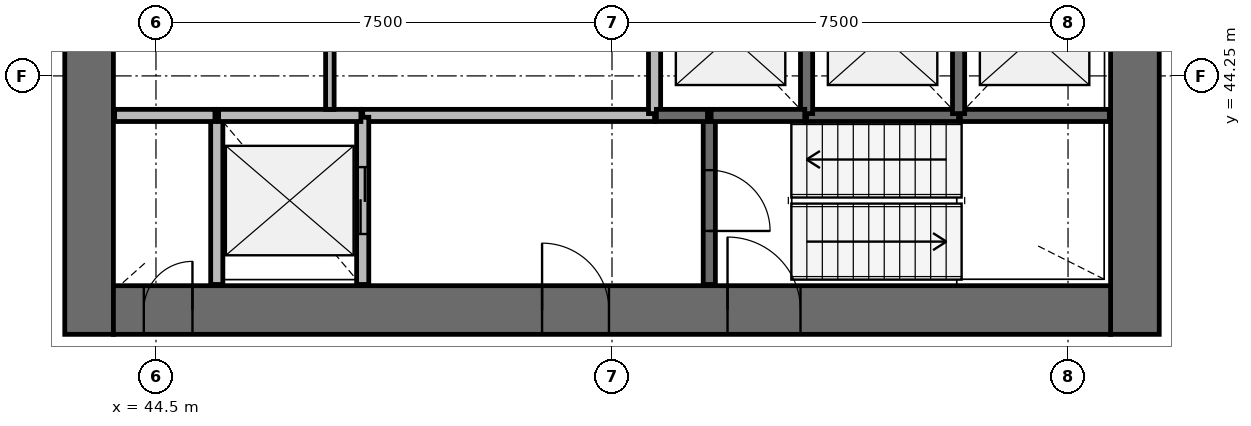
"""IFC4 building model, lengths in metres.
Left out: names, types, materials, properties, quantities, classifications, styles, units other than length and angle.
Written with IfcOpenShell. Run it as: python <this file> out.ifc"""

import sys

from ifc_helpers import new_model, si_unit, direction, frame, frame_2d, origin, place, context, subcontext, project, spatial, rectangle, extrude, source, transform, mapped, element, fill, save


model = new_model("IFC4")
c1 = context("Model", 3, precision=1e-05, world=origin(), true_north=direction((0.0, 1.0)))
c2 = subcontext(c1, "Body", "Model", "MODEL_VIEW")
j1 = project(units=[si_unit("LENGTHUNIT", "METRE"), si_unit("PLANEANGLEUNIT", "RADIAN")], contexts=[c1])
p1 = place(None, origin())
s1 = spatial("IfcSite", under=j1, at=p1, CompositionType="ELEMENT")
p2 = place(p1, origin())
s2 = spatial("IfcBuilding", under=s1, at=p2, CompositionType="ELEMENT")
p3 = place(p2, frame((0.0, 0.0, 152.6)))
s3 = spatial("IfcBuildingStorey", under=s2, at=p3, CompositionType="ELEMENT", Elevation=152.6)
p4 = place(p3, frame((60.6, 40.0, 0.0), z_axis=(0.0, 0.0, 1.0), x_axis=(0.0, 1.0, 0.0)))
e1 = element("IfcWall", 1, at=p4, inside=s3, PredefinedType="SHEAR", context=c2, shape_type="SweptSolid", body=[
    extrude(rectangle(XDim=16.0, YDim=0.8, at=frame_2d((8.0, 0.0))), origin(), (0.0, 0.0, 1.0), 3.9),
])
p5 = place(p4, frame((7.1, 0.0, 0.0)))
e2 = element("IfcOpeningElement", 2, at=p5, cuts=e1, PredefinedType="OPENING", context=c2, shape_type="SweptSolid", body=[
    extrude(rectangle(XDim=1.8, YDim=2.1, at=frame_2d((0.9, 1.05))), frame((0.0, 0.41, 0.0), z_axis=(0.0, -1.0, 0.0), x_axis=(1.0, 0.0, 0.0)), (0.0, 0.0, 1.0), 0.82),
])
p6 = place(p3, frame((43.4, 56.0, 0.0), z_axis=(0.0, 0.0, 1.0), x_axis=(0.0, -1.0, 0.0)))
e3 = element("IfcWall", 3, at=p6, inside=s3, PredefinedType="SHEAR", context=c2, shape_type="SweptSolid", body=[
    extrude(rectangle(XDim=16.0, YDim=0.8, at=frame_2d((8.0, 0.0))), origin(), (0.0, 0.0, 1.0), 3.9),
])
p7 = place(p6, frame((7.1, 0.0, 0.0)))
e4 = element("IfcOpeningElement", 4, at=p7, cuts=e3, PredefinedType="OPENING", context=c2, shape_type="SweptSolid", body=[
    extrude(rectangle(XDim=1.8, YDim=2.1, at=frame_2d((0.9, 1.05))), frame((0.0, 0.41, 0.0), z_axis=(0.0, -1.0, 0.0), x_axis=(1.0, 0.0, 0.0)), (0.0, 0.0, 1.0), 0.82),
])
p8 = place(p3, frame((43.8, 40.4, 0.0), z_axis=(0.0, 0.0, 1.0), x_axis=(1.0, 0.0, 0.0)))
e5 = element("IfcWall", 5, at=p8, inside=s3, PredefinedType="SHEAR", context=c2, shape_type="SweptSolid", body=[
    extrude(rectangle(XDim=16.4, YDim=0.8, at=frame_2d((8.2, 0.0))), origin(), (0.0, 0.0, 1.0), 3.9),
])
p9 = place(p8, frame((10.1, 0.0, 0.0)))
e6 = element("IfcOpeningElement", 6, at=p9, cuts=e5, PredefinedType="OPENING", context=c2, shape_type="SweptSolid", body=[
    extrude(rectangle(XDim=1.2, YDim=2.1, at=frame_2d((0.6, 1.05))), frame((0.0, 0.41, 0.0), z_axis=(0.0, -1.0, 0.0), x_axis=(1.0, 0.0, 0.0)), (0.0, 0.0, 1.0), 0.82),
])
p10 = place(p8, frame((7.05, 0.0, 0.0)))
e7 = element("IfcOpeningElement", 7, at=p10, cuts=e5, PredefinedType="OPENING", context=c2, shape_type="SweptSolid", body=[
    extrude(rectangle(XDim=1.1, YDim=2.1, at=frame_2d((0.55, 1.05))), frame((0.0, 0.41, 0.0), z_axis=(0.0, -1.0, 0.0), x_axis=(1.0, 0.0, 0.0)), (0.0, 0.0, 1.0), 0.82),
])
p11 = place(p8, frame((0.5, 0.0, 0.0)))
e8 = element("IfcOpeningElement", 8, at=p11, cuts=e5, PredefinedType="OPENING", context=c2, shape_type="SweptSolid", body=[
    extrude(rectangle(XDim=0.8, YDim=2.1, at=frame_2d((0.4, 1.05))), frame((0.0, 0.41, 0.0), z_axis=(0.0, -1.0, 0.0), x_axis=(1.0, 0.0, 0.0)), (0.0, 0.0, 1.0), 0.82),
])
p12 = place(p3, frame((52.7, 43.6, 0.0), z_axis=(0.0, 0.0, 1.0), x_axis=(-1.0, 0.0, 0.0)))
e9 = element("IfcWall", 9, at=p12, inside=s3, PredefinedType="SOLIDWALL", context=c2, shape_type="SweptSolid", body=[
    extrude(rectangle(XDim=4.8, YDim=0.2, at=frame_2d((2.4, 0.0))), origin(), (0.0, 0.0, 1.0), 3.58),
])
p13 = place(p3, frame((45.5, 43.6, 0.0), z_axis=(0.0, 0.0, 1.0), x_axis=(0.0, -1.0, 0.0)))
e10 = element("IfcWall", 10, at=p13, inside=s3, PredefinedType="SOLIDWALL", context=c2, shape_type="SweptSolid", body=[
    extrude(rectangle(XDim=2.78, YDim=0.2, at=frame_2d((1.39, 0.0))), origin(), (0.0, 0.0, 1.0), 3.58),
])
p14 = place(p3, frame((47.9, 40.82, 0.0), z_axis=(0.0, 0.0, 1.0), x_axis=(0.0, 1.0, 0.0)))
e11 = element("IfcWall", 11, at=p14, inside=s3, PredefinedType="SOLIDWALL", context=c2, shape_type="SweptSolid", body=[
    extrude(rectangle(XDim=2.75, YDim=0.2, at=frame_2d((1.375, 0.0))), origin(), (0.0, 0.0, 1.0), 3.58),
])
p15 = place(p14, frame((0.83, 0.0, 0.0)))
e12 = element("IfcOpeningElement", 12, at=p15, cuts=e11, PredefinedType="OPENING", context=c2, shape_type="SweptSolid", body=[
    extrude(rectangle(XDim=1.1, YDim=2.1, at=frame_2d((0.55, 1.05))), frame((0.0, 0.11, 0.0), z_axis=(0.0, -1.0, 0.0), x_axis=(1.0, 0.0, 0.0)), (0.0, 0.0, 1.0), 0.22),
])
p16 = place(p3, frame((53.6, 43.6, 0.0), z_axis=(0.0, 0.0, 1.0), x_axis=(0.0, -1.0, 0.0)))
e13 = element("IfcWall", 13, at=p16, inside=s3, PredefinedType="SOLIDWALL", context=c2, shape_type="SweptSolid", body=[
    extrude(rectangle(XDim=2.78, YDim=0.2, at=frame_2d((1.39, 0.0))), origin(), (0.0, 0.0, 1.0), 3.58),
])
p17 = place(p16, frame((0.9, 0.0, 0.0)))
e14 = element("IfcOpeningElement", 14, at=p17, cuts=e13, PredefinedType="OPENING", context=c2, shape_type="SweptSolid", body=[
    extrude(rectangle(XDim=1.0, YDim=2.1, at=frame_2d((0.5, 1.05))), frame((0.0, 0.11, 0.0), z_axis=(0.0, -1.0, 0.0), x_axis=(1.0, 0.0, 0.0)), (0.0, 0.0, 1.0), 0.22),
])
p18 = place(p3, frame((55.2, 43.6, 0.0), z_axis=(0.0, 0.0, 1.0), x_axis=(1.0, 0.0, 0.0)))
e15 = element("IfcWall", 15, at=p18, inside=s3, PredefinedType="SOLIDWALL", context=c2, shape_type="SweptSolid", body=[
    extrude(rectangle(XDim=2.5, YDim=0.2, at=frame_2d((1.25, 0.0))), origin(), (0.0, 0.0, 1.0), 3.58),
])
p19 = place(p3, frame((57.73, 43.6, 0.0), z_axis=(0.0, 0.0, 1.0), x_axis=(1.0, 0.0, 0.0)))
e16 = element("IfcWall", 16, at=p19, inside=s3, PredefinedType="SOLIDWALL", context=c2, shape_type="SweptSolid", body=[
    extrude(rectangle(XDim=2.45, YDim=0.2, at=frame_2d((1.225, 0.0))), origin(), (0.0, 0.0, 1.0), 3.58),
])
p20 = place(p3, frame((47.87, 43.6, 0.0), z_axis=(0.0, 0.0, 1.0), x_axis=(-1.0, 0.0, 0.0)))
e17 = element("IfcWall", 17, at=p20, inside=s3, PredefinedType="SOLIDWALL", context=c2, shape_type="SweptSolid", body=[
    extrude(rectangle(XDim=2.34, YDim=0.2, at=frame_2d((1.17, 0.0))), origin(), (0.0, 0.0, 1.0), 3.58),
])
for number, where, z_axis, x_axis in (
    (18, (52.7, 45.99, 0.0), (0.0, 0.0, 1.0), (0.0, -1.0, 0.0)),
    (19, (55.2, 43.63, 0.0), (0.0, 0.0, 1.0), (0.0, 1.0, 0.0)),
    (20, (57.7, 43.63, 0.0), (0.0, 0.0, 1.0), (0.0, 1.0, 0.0)),
):
    element("IfcWall", number, at=place(p3, frame(where, z_axis=z_axis, x_axis=x_axis)), inside=s3, PredefinedType="SOLIDWALL", context=c2, shape_type="SweptSolid", body=[
        extrude(rectangle(XDim=2.36, YDim=0.2, at=frame_2d((1.18, 0.0))), origin(), (0.0, 0.0, 1.0), 3.58),
    ])
p21 = place(p3, frame((45.47, 43.6, 0.0), z_axis=(0.0, 0.0, 1.0), x_axis=(-1.0, 0.0, 0.0)))
e21 = element("IfcWall", 21, at=p21, inside=s3, PredefinedType="SOLIDWALL", context=c2, shape_type="SweptSolid", body=[
    extrude(rectangle(XDim=1.65, YDim=0.2, at=frame_2d((0.825, 0.0))), origin(), (0.0, 0.0, 1.0), 3.58),
])
p22 = place(p3, frame((53.63, 43.6, 0.0), z_axis=(0.0, 0.0, 1.0), x_axis=(1.0, 0.0, 0.0)))
e22 = element("IfcWall", 22, at=p22, inside=s3, PredefinedType="SOLIDWALL", context=c2, shape_type="SweptSolid", body=[
    extrude(rectangle(XDim=1.54, YDim=0.2, at=frame_2d((0.77, 0.0))), origin(), (0.0, 0.0, 1.0), 3.58),
])
p23 = place(p3, frame((52.73, 43.6, 0.0), z_axis=(0.0, 0.0, 1.0), x_axis=(1.0, 0.0, 0.0)))
e23 = element("IfcWall", 23, at=p23, inside=s3, PredefinedType="SOLIDWALL", context=c2, shape_type="SweptSolid", body=[
    extrude(rectangle(XDim=0.84, YDim=0.2, at=frame_2d((0.42, 0.0))), origin(), (0.0, 0.0, 1.0), 3.58),
])
p24 = place(p3, frame((47.36, 43.7, 0.0), z_axis=(0.0, 0.0, 1.0), x_axis=(0.0, 1.0, 0.0)))
e24 = element("IfcWall", 24, at=p24, inside=s3, PredefinedType="PARTITIONING", context=c2, shape_type="SweptSolid", body=[
    extrude(rectangle(XDim=2.29, YDim=0.14, at=frame_2d((1.145, 0.0))), origin(), (0.0, 0.0, 1.0), 2.88),
])
m1 = source(origin(), c2, "Body", "SweptSolid", [
    extrude(rectangle(XDim=1.1, YDim=2.1, at=frame_2d((0.55, 1.05))), frame((0.0, 0.025, 0.0), z_axis=(0.0, -1.0, 0.0), x_axis=(1.0, 0.0, 0.0)), (0.0, 0.0, 1.0), 0.05),
])
p25 = place(p15, origin())
e25 = element("IfcDoor", 25, at=p25, inside=s3, OperationType="DOUBLE_DOOR_SLIDING", PredefinedType="USERDEFINED", context=c2, shape_type="MappedRepresentation", body=[
    mapped(m1, transform((0.0, 0.0, 0.0), scale=1.0)),
])
fill(e12, e25)
m2 = source(origin(), c2, "Body", "SweptSolid", [
    extrude(rectangle(XDim=1.2, YDim=2.1, at=frame_2d((0.6, 1.05))), frame((0.0, 0.025, 0.0), z_axis=(0.0, -1.0, 0.0), x_axis=(1.0, 0.0, 0.0)), (0.0, 0.0, 1.0), 0.05),
])
p26 = place(p9, origin())
e26 = element("IfcDoor", 26, at=p26, inside=s3, OperationType="SINGLE_SWING_LEFT", PredefinedType="DOOR", context=c2, shape_type="MappedRepresentation", body=[
    mapped(m2, transform((0.0, 0.0, 0.0), scale=1.0)),
])
fill(e6, e26)
m3 = source(origin(), c2, "Body", "SweptSolid", [
    extrude(rectangle(XDim=1.0, YDim=2.1, at=frame_2d((0.5, 1.05))), frame((0.0, 0.025, 0.0), z_axis=(0.0, -1.0, 0.0), x_axis=(1.0, 0.0, 0.0)), (0.0, 0.0, 1.0), 0.05),
])
p27 = place(p17, origin())
e27 = element("IfcDoor", 27, at=p27, inside=s3, OperationType="SINGLE_SWING_RIGHT", PredefinedType="DOOR", context=c2, shape_type="MappedRepresentation", body=[
    mapped(m3, transform((0.0, 0.0, 0.0), scale=1.0)),
])
fill(e14, e27)
m4 = source(origin(), c2, "Body", "SweptSolid", [
    extrude(rectangle(XDim=1.1, YDim=2.1, at=frame_2d((0.55, 1.05))), frame((0.0, 0.025, 0.0), z_axis=(0.0, -1.0, 0.0), x_axis=(1.0, 0.0, 0.0)), (0.0, 0.0, 1.0), 0.05),
])
p28 = place(p10, origin())
e28 = element("IfcDoor", 28, at=p28, inside=s3, OperationType="SINGLE_SWING_LEFT", PredefinedType="DOOR", context=c2, shape_type="MappedRepresentation", body=[
    mapped(m4, transform((0.0, 0.0, 0.0), scale=1.0)),
])
fill(e7, e28)
m5 = source(origin(), c2, "Body", "SweptSolid", [
    extrude(rectangle(XDim=0.8, YDim=2.1, at=frame_2d((0.4, 1.05))), frame((0.0, 0.025, 0.0), z_axis=(0.0, -1.0, 0.0), x_axis=(1.0, 0.0, 0.0)), (0.0, 0.0, 1.0), 0.05),
])
p29 = place(p11, origin())
e29 = element("IfcDoor", 29, at=p29, inside=s3, OperationType="SINGLE_SWING_RIGHT", PredefinedType="DOOR", context=c2, shape_type="MappedRepresentation", body=[
    mapped(m5, transform((0.0, 0.0, 0.0), scale=1.0)),
])
fill(e8, e29)
save(model, sys.argv[1])
